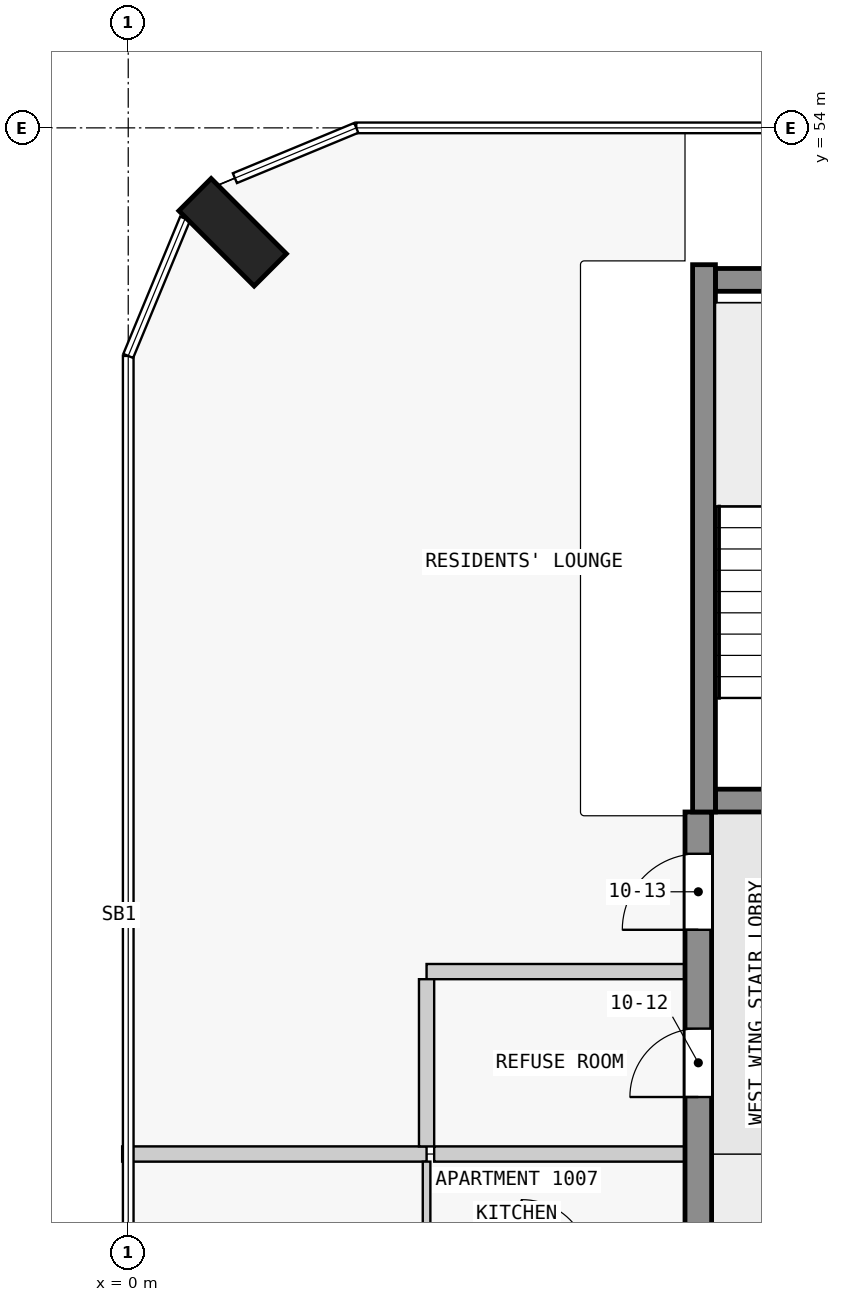
"""IFC4 building model, lengths in metres.
Left out: names, types, materials, properties, quantities, classifications, styles, units other than length and angle.
Written with IfcOpenShell. Run it as: python <this file> out.ifc"""

import sys

from ifc_helpers import new_model, si_unit, direction, frame, frame_2d, origin, origin_2d, place, context, subcontext, project, spatial, rectangle, extrude, element, fill, save


model = new_model("IFC4")
c1 = context("Model", 3, precision=1e-05, world=origin(), true_north=direction((0.0, 1.0)))
c2 = subcontext(c1, "Body", "Model", "MODEL_VIEW")
j1 = project(units=[si_unit("LENGTHUNIT", "METRE"), si_unit("PLANEANGLEUNIT", "RADIAN")], contexts=[c1])
p1 = place(None, origin())
s1 = spatial("IfcSite", under=j1, at=p1, CompositionType="ELEMENT")
p2 = place(p1, origin())
s2 = spatial("IfcBuilding", under=s1, at=p2, CompositionType="ELEMENT")
p3 = place(p2, frame((0.0, 0.0, 44.3)))
s3 = spatial("IfcBuildingStorey", under=s2, at=p3, CompositionType="ELEMENT", Elevation=44.3)
p4 = place(p3, frame((1.374, 52.626, 0.0), z_axis=(0.0, 0.0, 1.0), x_axis=(0.707106781187, 0.707106781187, 0.0)))
e1 = element("IfcColumn", 1, at=p4, inside=s3, PredefinedType="COLUMN", context=c2, shape_type="SweptSolid", body=[
    extrude(rectangle(XDim=0.6, YDim=1.4, at=origin_2d()), origin(), (0.0, 0.0, 1.0), 3.5),
])
p5 = place(p3, frame((7.725, 45.15, 0.0), z_axis=(0.0, 0.0, 1.0), x_axis=(1.0, 0.0, 0.0)))
e2 = element("IfcWall", 2, at=p5, inside=s3, PredefinedType="SHEAR", context=c2, shape_type="SweptSolid", body=[
    extrude(rectangle(XDim=2.55, YDim=0.3, at=frame_2d((1.275, 0.0))), origin(), (0.0, 0.0, 1.0), 3.5),
])
p6 = place(p5, frame((0.725, 0.0, 0.0)))
e3 = element("IfcOpeningElement", 3, at=p6, cuts=e2, PredefinedType="OPENING", context=c2, shape_type="SweptSolid", body=[
    extrude(rectangle(XDim=1.1, YDim=2.1, at=frame_2d((0.55, 1.05))), frame((0.0, 0.16, 0.0), z_axis=(0.0, -1.0, 0.0), x_axis=(1.0, 0.0, 0.0)), (0.0, 0.0, 1.0), 0.32),
])
p7 = place(p3, frame((7.725, 52.0, 0.0), z_axis=(0.0, 0.0, 1.0), x_axis=(1.0, 0.0, 0.0)))
e4 = element("IfcWall", 4, at=p7, inside=s3, PredefinedType="SHEAR", context=c2, shape_type="SweptSolid", body=[
    extrude(rectangle(XDim=2.55, YDim=0.3, at=frame_2d((1.275, 0.0))), origin(), (0.0, 0.0, 1.0), 3.5),
])
p8 = place(p3, frame((7.575, 45.0, 0.0), z_axis=(0.0, 0.0, 1.0), x_axis=(0.0, 1.0, 0.0)))
e5 = element("IfcWall", 5, at=p8, inside=s3, PredefinedType="SHEAR", context=c2, shape_type="SweptSolid", body=[
    extrude(rectangle(XDim=7.2, YDim=0.3, at=frame_2d((3.6, 0.0))), origin(), (0.0, 0.0, 1.0), 3.5),
])
p9 = place(p3, frame((7.5, 18.0, 0.0), z_axis=(0.0, 0.0, 1.0), x_axis=(0.0, 1.0, 0.0)))
e6 = element("IfcWall", 6, at=p9, inside=s3, PredefinedType="SHEAR", context=c2, shape_type="SweptSolid", body=[
    extrude(rectangle(XDim=27.0, YDim=0.35, at=frame_2d((13.5, 0.0))), origin(), (0.0, 0.0, 1.0), 3.25),
])
p10 = place(p9, frame((4.75, 0.0, 0.0)))
e7 = element("IfcOpeningElement", 7, at=p10, cuts=e6, PredefinedType="OPENING", context=c2, shape_type="SweptSolid", body=[
    extrude(rectangle(XDim=1.0, YDim=2.1, at=frame_2d((0.5, 1.05))), frame((0.0, 0.185, 0.0), z_axis=(0.0, -1.0, 0.0), x_axis=(1.0, 0.0, 0.0)), (0.0, 0.0, 1.0), 0.37),
])
p11 = place(p9, frame((15.25, 0.0, 0.0)))
e8 = element("IfcOpeningElement", 8, at=p11, cuts=e6, PredefinedType="OPENING", context=c2, shape_type="SweptSolid", body=[
    extrude(rectangle(XDim=1.0, YDim=2.1, at=frame_2d((0.5, 1.05))), frame((0.0, 0.185, 0.0), z_axis=(0.0, -1.0, 0.0), x_axis=(1.0, 0.0, 0.0)), (0.0, 0.0, 1.0), 0.37),
])
p12 = place(p9, frame((19.75, 0.0, 0.0)))
e9 = element("IfcOpeningElement", 9, at=p12, cuts=e6, PredefinedType="OPENING", context=c2, shape_type="SweptSolid", body=[
    extrude(rectangle(XDim=1.0, YDim=2.1, at=frame_2d((0.5, 1.05))), frame((0.0, 0.185, 0.0), z_axis=(0.0, -1.0, 0.0), x_axis=(1.0, 0.0, 0.0)), (0.0, 0.0, 1.0), 0.37),
])
p13 = place(p9, frame((23.25, 0.0, 0.0)))
e10 = element("IfcOpeningElement", 10, at=p13, cuts=e6, PredefinedType="OPENING", context=c2, shape_type="SweptSolid", body=[
    extrude(rectangle(XDim=0.9, YDim=2.1, at=frame_2d((0.45, 1.05))), frame((0.0, 0.185, 0.0), z_axis=(0.0, -1.0, 0.0), x_axis=(1.0, 0.0, 0.0)), (0.0, 0.0, 1.0), 0.37),
])
p14 = place(p9, frame((25.45, 0.0, 0.0)))
e11 = element("IfcOpeningElement", 11, at=p14, cuts=e6, PredefinedType="OPENING", context=c2, shape_type="SweptSolid", body=[
    extrude(rectangle(XDim=1.0, YDim=2.1, at=frame_2d((0.5, 1.05))), frame((0.0, 0.185, 0.0), z_axis=(0.0, -1.0, 0.0), x_axis=(1.0, 0.0, 0.0)), (0.0, 0.0, 1.0), 0.37),
])
p15 = place(p3, frame((7.325, 40.5, 0.0), z_axis=(0.0, 0.0, 1.0), x_axis=(-1.0, 0.0, 0.0)))
e12 = element("IfcWall", 12, at=p15, inside=s3, PredefinedType="PARTITIONING", context=c2, shape_type="SweptSolid", body=[
    extrude(rectangle(XDim=3.3, YDim=0.2, at=frame_2d((1.65, 0.0))), origin(), (0.0, 0.0, 1.0), 3.25),
])
p16 = place(p3, frame((-0.08, 40.5, 0.0), z_axis=(0.0, 0.0, 1.0), x_axis=(1.0, 0.0, 0.0)))
e13 = element("IfcWall", 13, at=p16, inside=s3, PredefinedType="PARTITIONING", context=c2, shape_type="SweptSolid", body=[
    extrude(rectangle(XDim=4.005, YDim=0.2, at=frame_2d((2.002, 0.0))), origin(), (0.0, 0.0, 1.0), 3.25),
])
p17 = place(p3, frame((7.325, 42.9, 0.0), z_axis=(0.0, 0.0, 1.0), x_axis=(-1.0, 0.0, 0.0)))
e14 = element("IfcWall", 14, at=p17, inside=s3, PredefinedType="PARTITIONING", context=c2, shape_type="SweptSolid", body=[
    extrude(rectangle(XDim=3.4, YDim=0.2, at=frame_2d((1.7, 0.0))), origin(), (0.0, 0.0, 1.0), 3.25),
])
p18 = place(p3, frame((3.925, 40.4, 0.0), z_axis=(0.0, 0.0, 1.0), x_axis=(0.0, -1.0, 0.0)))
e15 = element("IfcWall", 15, at=p18, inside=s3, PredefinedType="PARTITIONING", context=c2, shape_type="SweptSolid", body=[
    extrude(rectangle(XDim=1.35, YDim=0.1, at=frame_2d((0.675, 0.0))), origin(), (0.0, 0.0, 1.0), 3.25),
])
p19 = place(p3, frame((3.925, 42.8, 0.0), z_axis=(0.0, 0.0, 1.0), x_axis=(0.0, -1.0, 0.0)))
e16 = element("IfcWall", 16, at=p19, inside=s3, PredefinedType="PARTITIONING", context=c2, shape_type="SweptSolid", body=[
    extrude(rectangle(XDim=2.2, YDim=0.2, at=frame_2d((1.1, 0.0))), origin(), (0.0, 0.0, 1.0), 3.25),
])
p20 = place(p13, origin())
e17 = element("IfcDoor", 17, at=p20, inside=s3, OperationType="SINGLE_SWING_RIGHT", PredefinedType="DOOR", context=c2, shape_type="SweptSolid", body=[
    extrude(rectangle(XDim=0.9, YDim=2.1, at=frame_2d((0.45, 1.05))), frame((0.0, 0.025, 0.0), z_axis=(0.0, -1.0, 0.0), x_axis=(1.0, 0.0, 0.0)), (0.0, 0.0, 1.0), 0.05),
])
fill(e10, e17)
p21 = place(p14, origin())
e18 = element("IfcDoor", 18, at=p21, inside=s3, OperationType="SINGLE_SWING_RIGHT", PredefinedType="DOOR", context=c2, shape_type="SweptSolid", body=[
    extrude(rectangle(XDim=1.0, YDim=2.1, at=frame_2d((0.5, 1.05))), frame((0.0, 0.025, 0.0), z_axis=(0.0, -1.0, 0.0), x_axis=(1.0, 0.0, 0.0)), (0.0, 0.0, 1.0), 0.05),
])
fill(e11, e18)
save(model, sys.argv[1])
